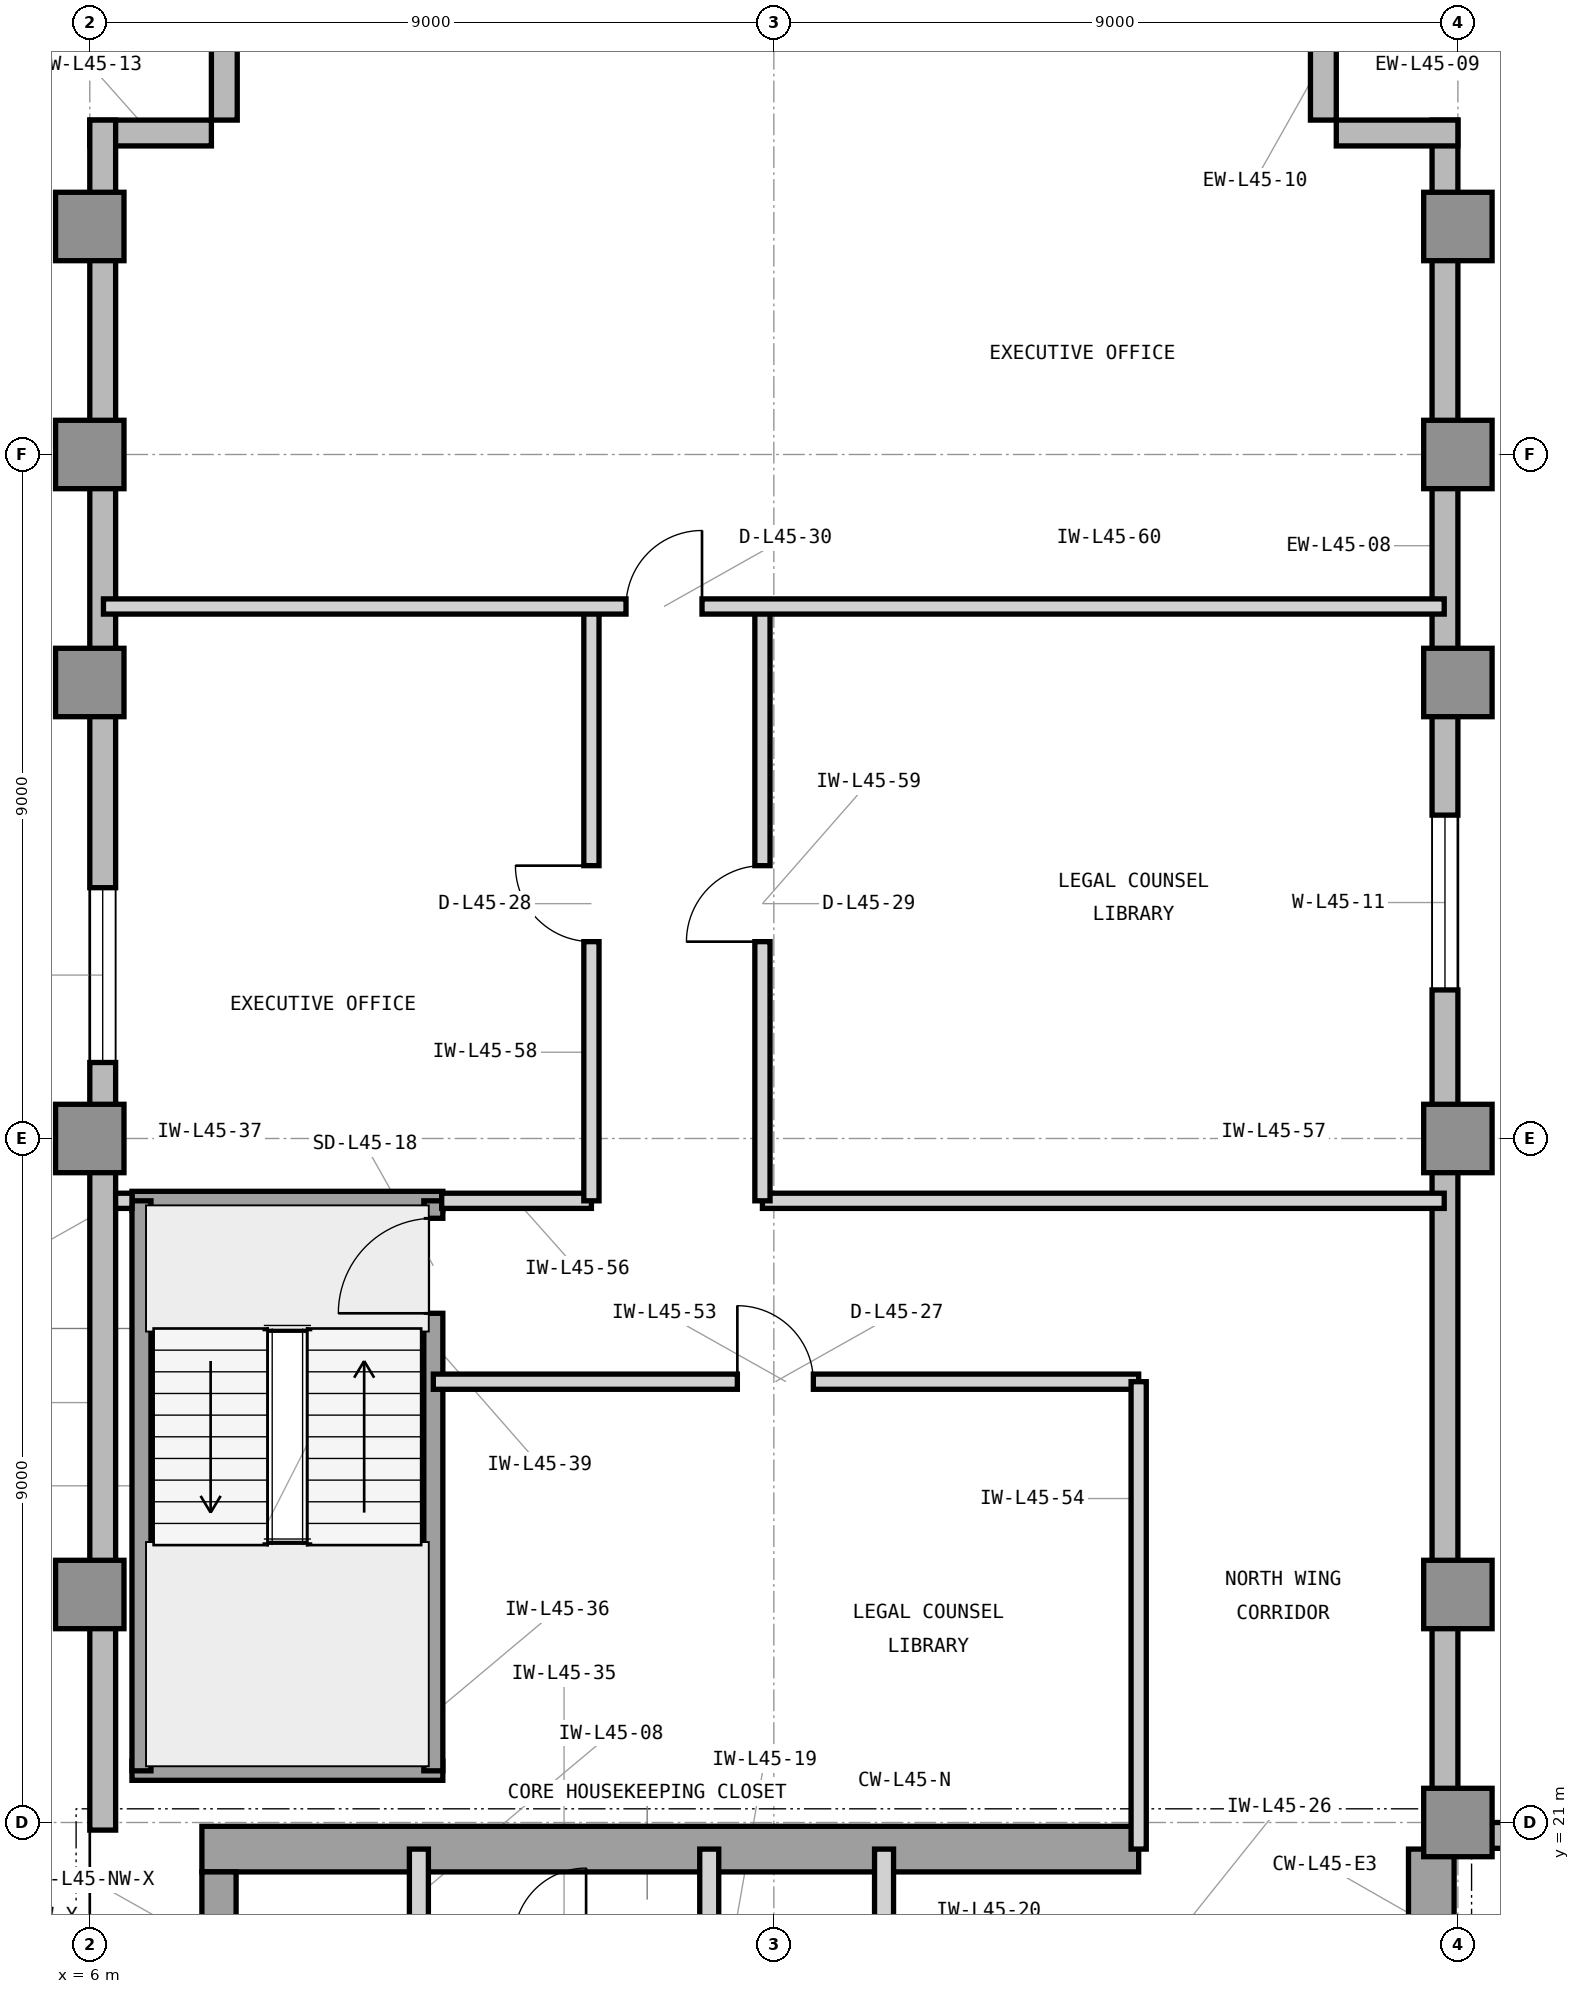
"""IFC4 building model, lengths in metres.
Left out: names, types, materials, properties, quantities, classifications, styles, units other than length and angle.
Written with IfcOpenShell. Run it as: python <this file> out.ifc"""

import sys

from ifc_helpers import new_model, si_unit, direction, frame, frame_2d, origin, origin_2d, place, context, subcontext, project, spatial, rectangle, extrude, element, fill, save


model = new_model("IFC4")
c1 = context("Model", 3, precision=1e-05, world=origin(), true_north=direction((0.0, 1.0)))
c2 = subcontext(c1, "Body", "Model", "MODEL_VIEW")
j1 = project(units=[si_unit("LENGTHUNIT", "METRE"), si_unit("PLANEANGLEUNIT", "RADIAN")], contexts=[c1])
p1 = place(None, origin())
s1 = spatial("IfcSite", under=j1, at=p1, CompositionType="ELEMENT")
p2 = place(p1, origin())
s2 = spatial("IfcBuilding", under=s1, at=p2, CompositionType="ELEMENT")
p3 = place(p2, frame((0.0, 0.0, 187.8)))
s3 = spatial("IfcBuildingStorey", under=s2, at=p3, CompositionType="ELEMENT", Elevation=187.8)
p4 = place(p3, frame((7.475, 20.65, 0.0), z_axis=(0.0, 0.0, 1.0), x_axis=(1.0, 0.0, 0.0)))
e1 = element("IfcWall", 1, at=p4, inside=s3, PredefinedType="SHEAR", context=c2, shape_type="SweptSolid", body=[
    extrude(rectangle(XDim=12.325, YDim=0.6, at=frame_2d((6.163, 0.0))), origin(), (0.0, 0.0, 1.0), 3.9),
])
p5 = place(p3, frame((23.65, 16.6, 0.0), z_axis=(0.0, 0.0, 1.0), x_axis=(0.0, 1.0, 0.0)))
e2 = element("IfcWall", 2, at=p5, inside=s3, PredefinedType="SHEAR", context=c2, shape_type="SweptSolid", body=[
    extrude(rectangle(XDim=4.05, YDim=0.6, at=frame_2d((2.025, 0.0))), origin(), (0.0, 0.0, 1.0), 3.9),
])
p6 = place(p3, frame((7.7, 19.575, 0.0), z_axis=(0.0, 0.0, 1.0), x_axis=(0.0, 1.0, 0.0)))
e3 = element("IfcWall", 3, at=p6, inside=s3, PredefinedType="SHEAR", context=c2, shape_type="SweptSolid", body=[
    extrude(rectangle(XDim=0.775, YDim=0.45, at=frame_2d((0.388, 0.0))), origin(), (0.0, 0.0, 1.0), 3.9),
])
for number, where, z_axis, x_axis in (
    (4, (24.0, 21.0, 0.0), (0.0, 0.0, 1.0), (1.0, 0.0, 0.0)),
    (5, (6.0, 24.0, 0.0), (0.0, 0.0, 1.0), (1.0, 0.0, 0.0)),
    (6, (24.0, 24.0, 0.0), (0.0, 0.0, 1.0), (1.0, 0.0, 0.0)),
    (7, (6.0, 30.0, 0.0), (0.0, 0.0, 1.0), (1.0, 0.0, 0.0)),
    (8, (24.0, 30.0, 0.0), (0.0, 0.0, 1.0), (1.0, 0.0, 0.0)),
    (9, (6.0, 36.0, 0.0), (0.0, 0.0, 1.0), (1.0, 0.0, 0.0)),
    (10, (24.0, 36.0, 0.0), (0.0, 0.0, 1.0), (1.0, 0.0, 0.0)),
    (11, (6.0, 39.0, 0.0), (0.0, 0.0, 1.0), (1.0, 0.0, 0.0)),
    (12, (24.0, 39.0, 0.0), (0.0, 0.0, 1.0), (1.0, 0.0, 0.0)),
    (13, (6.0, 42.0, 0.0), (0.0, 0.0, 1.0), (1.0, 0.0, 0.0)),
    (14, (24.0, 42.0, 0.0), (0.0, 0.0, 1.0), (1.0, 0.0, 0.0)),
):
    element("IfcColumn", number, at=place(p3, frame(where, z_axis=z_axis, x_axis=x_axis)), inside=s3, PredefinedType="COLUMN", context=c2, shape_type="SweptSolid", body=[
        extrude(rectangle(XDim=0.9, YDim=0.9, at=origin_2d()), origin(), (0.0, 0.0, 1.0), 3.9),
    ])
p7 = place(p3, frame((55.4, 20.83, 0.0), z_axis=(0.0, 0.0, 1.0), x_axis=(-1.0, 0.0, 0.0)))
e15 = element("IfcWall", 15, at=p7, inside=s3, PredefinedType="STANDARD", context=c2, shape_type="SweptSolid", body=[
    extrude(rectangle(XDim=31.4, YDim=0.34, at=frame_2d((15.7, 0.0))), origin(), (0.0, 0.0, 1.0), 3.7),
])
p8 = place(p7, frame((29.046, 0.0, 0.9)))
e16 = element("IfcOpeningElement", 16, at=p8, cuts=e15, PredefinedType="OPENING", context=c2, shape_type="SweptSolid", body=[
    extrude(rectangle(XDim=1.6, YDim=2.2, at=frame_2d((0.8, 1.1))), frame((0.0, 0.18, 0.0), z_axis=(0.0, -1.0, 0.0), x_axis=(1.0, 0.0, 0.0)), (0.0, 0.0, 1.0), 0.36),
])
p9 = place(p7, frame((10.125, 0.0, 0.9)))
e17 = element("IfcOpeningElement", 17, at=p9, cuts=e15, PredefinedType="OPENING", context=c2, shape_type="SweptSolid", body=[
    extrude(rectangle(XDim=2.3, YDim=2.2, at=frame_2d((1.15, 1.1))), frame((0.0, 0.18, 0.0), z_axis=(0.0, -1.0, 0.0), x_axis=(1.0, 0.0, 0.0)), (0.0, 0.0, 1.0), 0.36),
])
p10 = place(p3, frame((23.83, 21.0, 0.0), z_axis=(0.0, 0.0, 1.0), x_axis=(0.0, 1.0, 0.0)))
e18 = element("IfcWall", 18, at=p10, inside=s3, PredefinedType="STANDARD", context=c2, shape_type="SweptSolid", body=[
    extrude(rectangle(XDim=22.4, YDim=0.34, at=frame_2d((11.2, 0.0))), origin(), (0.0, 0.0, 1.0), 3.7),
])
p11 = place(p10, frame((10.955, 0.0, 0.9)))
e19 = element("IfcOpeningElement", 19, at=p11, cuts=e18, PredefinedType="OPENING", context=c2, shape_type="SweptSolid", body=[
    extrude(rectangle(XDim=2.3, YDim=2.2, at=frame_2d((1.15, 1.1))), frame((0.0, 0.18, 0.0), z_axis=(0.0, -1.0, 0.0), x_axis=(1.0, 0.0, 0.0)), (0.0, 0.0, 1.0), 0.36),
])
for number, where, z_axis, x_axis in (
    (20, (24.0, 43.23, 0.0), (0.0, 0.0, 1.0), (-1.0, 0.0, 0.0)),
    (21, (22.23, 43.4, 0.0), (0.0, 0.0, 1.0), (0.0, 1.0, 0.0)),
    (22, (7.77, 45.0, 0.0), (0.0, 0.0, 1.0), (0.0, -1.0, 0.0)),
    (23, (7.6, 43.23, 0.0), (0.0, 0.0, 1.0), (-1.0, 0.0, 0.0)),
):
    element("IfcWall", number, at=place(p3, frame(where, z_axis=z_axis, x_axis=x_axis)), inside=s3, PredefinedType="STANDARD", context=c2, shape_type="SweptSolid", body=[
        extrude(rectangle(XDim=1.6, YDim=0.34, at=frame_2d((0.8, 0.0))), origin(), (0.0, 0.0, 1.0), 3.7),
    ])
p12 = place(p3, frame((6.17, 43.4, 0.0), z_axis=(0.0, 0.0, 1.0), x_axis=(0.0, -1.0, 0.0)))
e24 = element("IfcWall", 24, at=p12, inside=s3, PredefinedType="STANDARD", context=c2, shape_type="SweptSolid", body=[
    extrude(rectangle(XDim=22.5, YDim=0.34, at=frame_2d((11.25, 0.0))), origin(), (0.0, 0.0, 1.0), 3.7),
])
p13 = place(p12, frame((10.1, 0.0, 0.9)))
e25 = element("IfcOpeningElement", 25, at=p13, cuts=e24, PredefinedType="OPENING", context=c2, shape_type="SweptSolid", body=[
    extrude(rectangle(XDim=2.3, YDim=2.2, at=frame_2d((1.15, 1.1))), frame((0.0, 0.18, 0.0), z_axis=(0.0, -1.0, 0.0), x_axis=(1.0, 0.0, 0.0)), (0.0, 0.0, 1.0), 0.36),
])
p14 = place(p3, frame((10.33, 19.45, 0.0), z_axis=(0.0, 0.0, 1.0), x_axis=(0.0, 1.0, 0.0)))
e26 = element("IfcWall", 26, at=p14, inside=s3, PredefinedType="PARTITIONING", context=c2, shape_type="SweptSolid", body=[
    extrude(rectangle(XDim=1.2, YDim=0.25, at=frame_2d((0.6, 0.0))), origin(), (0.0, 0.0, 1.0), 3.073),
])
for number, where, z_axis, x_axis in (
    (27, (14.15, 16.7, 0.0), (0.0, 0.0, 1.0), (0.0, 1.0, 0.0)),
    (28, (16.45, 16.7, 0.0), (0.0, 0.0, 1.0), (0.0, 1.0, 0.0)),
):
    element("IfcWall", number, at=place(p3, frame(where, z_axis=z_axis, x_axis=x_axis)), inside=s3, PredefinedType="PARTITIONING", context=c2, shape_type="SweptSolid", body=[
        extrude(rectangle(XDim=3.95, YDim=0.25, at=frame_2d((1.975, 0.0))), origin(), (0.0, 0.0, 1.0), 3.69),
    ])
for number, where, z_axis, x_axis in (
    (29, (6.555, 21.68, 0.0), (0.0, 0.0, 1.0), (1.0, 0.0, 0.0)),
    (30, (6.555, 29.18, 0.0), (0.0, 0.0, 1.0), (1.0, 0.0, 0.0)),
):
    element("IfcWall", number, at=place(p3, frame(where, z_axis=z_axis, x_axis=x_axis)), inside=s3, PredefinedType="SHEAR", context=c2, shape_type="SweptSolid", body=[
        extrude(rectangle(XDim=4.09, YDim=0.25, at=frame_2d((2.045, 0.0))), origin(), (0.0, 0.0, 1.0), 3.9),
    ])
p15 = place(p3, frame((6.68, 21.68, 0.0), z_axis=(0.0, 0.0, 1.0), x_axis=(0.0, 1.0, 0.0)))
e31 = element("IfcWall", 31, at=p15, inside=s3, PredefinedType="SHEAR", context=c2, shape_type="SweptSolid", body=[
    extrude(rectangle(XDim=7.5, YDim=0.25, at=frame_2d((3.75, 0.0))), origin(), (0.0, 0.0, 1.0), 3.9),
])
p16 = place(p3, frame((10.52, 21.68, 0.0), z_axis=(0.0, 0.0, 1.0), x_axis=(0.0, 1.0, 0.0)))
e32 = element("IfcWall", 32, at=p16, inside=s3, PredefinedType="SHEAR", context=c2, shape_type="SweptSolid", body=[
    extrude(rectangle(XDim=7.5, YDim=0.25, at=frame_2d((3.75, 0.0))), origin(), (0.0, 0.0, 1.0), 3.9),
])
p17 = place(p16, frame((6.02, 0.0, 0.0)))
e33 = element("IfcOpeningElement", 33, at=p17, cuts=e32, PredefinedType="OPENING", context=c2, shape_type="SweptSolid", body=[
    extrude(rectangle(XDim=1.25, YDim=2.2, at=frame_2d((0.625, 1.1))), frame((0.0, 0.135, 0.0), z_axis=(0.0, -1.0, 0.0), x_axis=(1.0, 0.0, 0.0)), (0.0, 0.0, 1.0), 0.27),
])
p18 = place(p3, frame((10.52, 26.8, 0.0), z_axis=(0.0, 0.0, 1.0), x_axis=(1.0, 0.0, 0.0)))
e34 = element("IfcWall", 34, at=p18, inside=s3, PredefinedType="PARTITIONING", context=c2, shape_type="SweptSolid", body=[
    extrude(rectangle(XDim=9.28, YDim=0.2, at=frame_2d((4.64, 0.0))), origin(), (0.0, 0.0, 1.0), 3.69),
])
p19 = place(p18, frame((4.0, 0.0, 0.0)))
e35 = element("IfcOpeningElement", 35, at=p19, cuts=e34, PredefinedType="OPENING", context=c2, shape_type="SweptSolid", body=[
    extrude(rectangle(XDim=1.0, YDim=2.15, at=frame_2d((0.5, 1.075))), frame((0.0, 0.11, 0.0), z_axis=(0.0, -1.0, 0.0), x_axis=(1.0, 0.0, 0.0)), (0.0, 0.0, 1.0), 0.22),
])
p20 = place(p3, frame((19.8, 20.65, 0.0), z_axis=(0.0, 0.0, 1.0), x_axis=(0.0, 1.0, 0.0)))
e36 = element("IfcWall", 36, at=p20, inside=s3, PredefinedType="PARTITIONING", context=c2, shape_type="SweptSolid", body=[
    extrude(rectangle(XDim=6.15, YDim=0.2, at=frame_2d((3.075, 0.0))), origin(), (0.0, 0.0, 1.0), 3.69),
])
p21 = place(p3, frame((6.34, 29.18, 0.0), z_axis=(0.0, 0.0, 1.0), x_axis=(1.0, 0.0, 0.0)))
e37 = element("IfcWall", 37, at=p21, inside=s3, PredefinedType="PARTITIONING", context=c2, shape_type="SweptSolid", body=[
    extrude(rectangle(XDim=0.215, YDim=0.2, at=frame_2d((0.107, 0.0))), origin(), (0.0, 0.0, 1.0), 3.69),
])
p22 = place(p3, frame((10.63, 29.18, 0.0), z_axis=(0.0, 0.0, 1.0), x_axis=(1.0, 0.0, 0.0)))
e38 = element("IfcWall", 38, at=p22, inside=s3, PredefinedType="PARTITIONING", context=c2, shape_type="SweptSolid", body=[
    extrude(rectangle(XDim=1.97, YDim=0.2, at=frame_2d((0.985, 0.0))), origin(), (0.0, 0.0, 1.0), 3.69),
])
p23 = place(p3, frame((14.85, 29.18, 0.0), z_axis=(0.0, 0.0, 1.0), x_axis=(1.0, 0.0, 0.0)))
e39 = element("IfcWall", 39, at=p23, inside=s3, PredefinedType="PARTITIONING", context=c2, shape_type="SweptSolid", body=[
    extrude(rectangle(XDim=8.97, YDim=0.2, at=frame_2d((4.485, 0.0))), origin(), (0.0, 0.0, 1.0), 3.69),
])
p24 = place(p3, frame((12.6, 29.18, 0.0), z_axis=(0.0, 0.0, 1.0), x_axis=(0.0, 1.0, 0.0)))
e40 = element("IfcWall", 40, at=p24, inside=s3, PredefinedType="PARTITIONING", context=c2, shape_type="SweptSolid", body=[
    extrude(rectangle(XDim=7.82, YDim=0.2, at=frame_2d((3.91, 0.0))), origin(), (0.0, 0.0, 1.0), 3.69),
])
p25 = place(p24, frame((3.41, 0.0, 0.0)))
e41 = element("IfcOpeningElement", 41, at=p25, cuts=e40, PredefinedType="OPENING", context=c2, shape_type="SweptSolid", body=[
    extrude(rectangle(XDim=1.0, YDim=2.15, at=frame_2d((0.5, 1.075))), frame((0.0, 0.11, 0.0), z_axis=(0.0, -1.0, 0.0), x_axis=(1.0, 0.0, 0.0)), (0.0, 0.0, 1.0), 0.22),
])
p26 = place(p3, frame((14.85, 29.18, 0.0), z_axis=(0.0, 0.0, 1.0), x_axis=(0.0, 1.0, 0.0)))
e42 = element("IfcWall", 42, at=p26, inside=s3, PredefinedType="PARTITIONING", context=c2, shape_type="SweptSolid", body=[
    extrude(rectangle(XDim=7.82, YDim=0.2, at=frame_2d((3.91, 0.0))), origin(), (0.0, 0.0, 1.0), 3.69),
])
p27 = place(p26, frame((3.41, 0.0, 0.0)))
e43 = element("IfcOpeningElement", 43, at=p27, cuts=e42, PredefinedType="OPENING", context=c2, shape_type="SweptSolid", body=[
    extrude(rectangle(XDim=1.0, YDim=2.15, at=frame_2d((0.5, 1.075))), frame((0.0, 0.11, 0.0), z_axis=(0.0, -1.0, 0.0), x_axis=(1.0, 0.0, 0.0)), (0.0, 0.0, 1.0), 0.22),
])
p28 = place(p3, frame((6.18, 37.0, 0.0), z_axis=(0.0, 0.0, 1.0), x_axis=(1.0, 0.0, 0.0)))
e44 = element("IfcWall", 44, at=p28, inside=s3, PredefinedType="PARTITIONING", context=c2, shape_type="SweptSolid", body=[
    extrude(rectangle(XDim=17.64, YDim=0.2, at=frame_2d((8.82, 0.0))), origin(), (0.0, 0.0, 1.0), 3.69),
])
p29 = place(p28, frame((6.875, 0.0, 0.0)))
e45 = element("IfcOpeningElement", 45, at=p29, cuts=e44, PredefinedType="OPENING", context=c2, shape_type="SweptSolid", body=[
    extrude(rectangle(XDim=1.0, YDim=2.15, at=frame_2d((0.5, 1.075))), frame((0.0, 0.11, 0.0), z_axis=(0.0, -1.0, 0.0), x_axis=(1.0, 0.0, 0.0)), (0.0, 0.0, 1.0), 0.22),
])
p30 = place(p13, origin())
e46 = element("IfcWindow", 46, at=p30, inside=s3, PartitioningType="SINGLE_PANEL", PredefinedType="WINDOW", context=c2, shape_type="SweptSolid", body=[
    extrude(rectangle(XDim=2.3, YDim=2.2, at=frame_2d((1.15, 1.1))), frame((0.0, 0.11, 0.0), z_axis=(0.0, -1.0, 0.0), x_axis=(1.0, 0.0, 0.0)), (0.0, 0.0, 1.0), 0.06),
])
fill(e25, e46)
p31 = place(p17, origin())
e47 = element("IfcDoor", 47, at=p31, inside=s3, OperationType="SINGLE_SWING_LEFT", PredefinedType="DOOR", context=c2, shape_type="SweptSolid", body=[
    extrude(rectangle(XDim=1.25, YDim=2.2, at=frame_2d((0.625, 1.1))), frame((0.0, 0.025, 0.0), z_axis=(0.0, -1.0, 0.0), x_axis=(1.0, 0.0, 0.0)), (0.0, 0.0, 1.0), 0.05),
])
fill(e33, e47)
p32 = place(p19, origin())
e48 = element("IfcDoor", 48, at=p32, inside=s3, OperationType="SINGLE_SWING_LEFT", PredefinedType="DOOR", context=c2, shape_type="SweptSolid", body=[
    extrude(rectangle(XDim=1.0, YDim=2.15, at=frame_2d((0.5, 1.075))), frame((0.0, 0.025, 0.0), z_axis=(0.0, -1.0, 0.0), x_axis=(1.0, 0.0, 0.0)), (0.0, 0.0, 1.0), 0.05),
])
fill(e35, e48)
p33 = place(p25, origin())
e49 = element("IfcDoor", 49, at=p33, inside=s3, OperationType="SINGLE_SWING_RIGHT", PredefinedType="DOOR", context=c2, shape_type="SweptSolid", body=[
    extrude(rectangle(XDim=1.0, YDim=2.15, at=frame_2d((0.5, 1.075))), frame((0.0, 0.025, 0.0), z_axis=(0.0, -1.0, 0.0), x_axis=(1.0, 0.0, 0.0)), (0.0, 0.0, 1.0), 0.05),
])
fill(e41, e49)
p34 = place(p27, origin())
e50 = element("IfcDoor", 50, at=p34, inside=s3, OperationType="SINGLE_SWING_LEFT", PredefinedType="DOOR", context=c2, shape_type="SweptSolid", body=[
    extrude(rectangle(XDim=1.0, YDim=2.15, at=frame_2d((0.5, 1.075))), frame((0.0, 0.025, 0.0), z_axis=(0.0, -1.0, 0.0), x_axis=(1.0, 0.0, 0.0)), (0.0, 0.0, 1.0), 0.05),
])
fill(e43, e50)
p35 = place(p29, origin())
e51 = element("IfcDoor", 51, at=p35, inside=s3, OperationType="SINGLE_SWING_RIGHT", PredefinedType="DOOR", context=c2, shape_type="SweptSolid", body=[
    extrude(rectangle(XDim=1.0, YDim=2.15, at=frame_2d((0.5, 1.075))), frame((0.0, 0.025, 0.0), z_axis=(0.0, -1.0, 0.0), x_axis=(1.0, 0.0, 0.0)), (0.0, 0.0, 1.0), 0.05),
])
fill(e45, e51)
p36 = place(p11, origin())
e52 = element("IfcWindow", 52, at=p36, inside=s3, PartitioningType="SINGLE_PANEL", PredefinedType="WINDOW", context=c2, shape_type="SweptSolid", body=[
    extrude(rectangle(XDim=2.3, YDim=2.2, at=frame_2d((1.15, 1.1))), frame((0.0, 0.11, 0.0), z_axis=(0.0, -1.0, 0.0), x_axis=(1.0, 0.0, 0.0)), (0.0, 0.0, 1.0), 0.06),
])
fill(e19, e52)
save(model, sys.argv[1])
